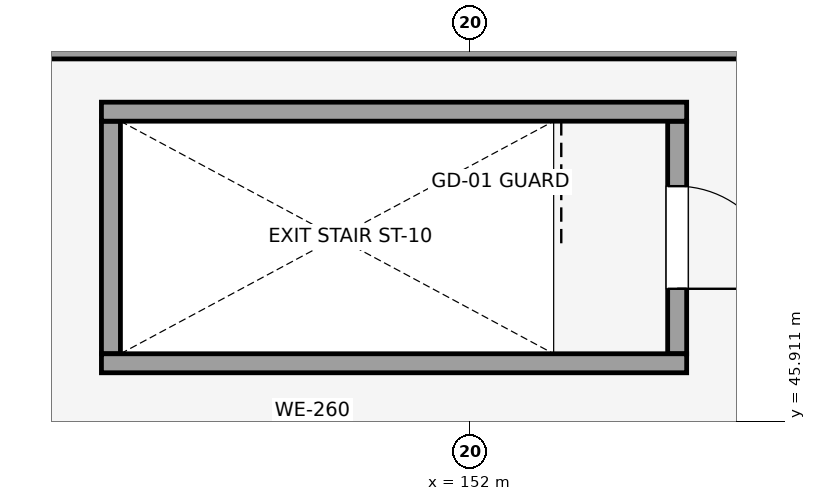
"""IFC4 building model, lengths in metres.
Left out: names, types, materials, properties, quantities, classifications, styles, units other than length and angle.
Written with IfcOpenShell. Run it as: python <this file> out.ifc"""

import sys

from ifc_helpers import new_model, si_unit, direction, frame, frame_2d, origin, place, context, subcontext, project, spatial, rectangle, extrude, element, fill, save


model = new_model("IFC4")
c1 = context("Model", 3, precision=1e-05, world=origin(), true_north=direction((0.0, 1.0)))
c2 = subcontext(c1, "Body", "Model", "MODEL_VIEW")
j1 = project(units=[si_unit("LENGTHUNIT", "METRE"), si_unit("PLANEANGLEUNIT", "RADIAN")], contexts=[c1])
p1 = place(None, origin())
s1 = spatial("IfcSite", under=j1, at=p1, CompositionType="ELEMENT")
p2 = place(p1, origin())
s2 = spatial("IfcBuilding", under=s1, at=p2, CompositionType="ELEMENT")
p3 = place(p2, frame((0.0, 0.0, 9.0)))
s3 = spatial("IfcBuildingStorey", under=s2, at=p3, CompositionType="ELEMENT", Elevation=9.0)
p4 = place(p3, frame((154.725, 49.86, 0.0), z_axis=(0.0, 0.0, 1.0), x_axis=(0.0, -1.0, 0.0)))
e1 = element("IfcWall", 1, at=p4, inside=s3, PredefinedType="SHEAR", context=c2, shape_type="SweptSolid", body=[
    extrude(rectangle(XDim=3.06, YDim=0.25, at=frame_2d((1.53, 0.0))), origin(), (0.0, 0.0, 1.0), 4.8),
])
p5 = place(p4, frame((0.855, 0.0, 0.0)))
e2 = element("IfcOpeningElement", 2, at=p5, cuts=e1, PredefinedType="OPENING", context=c2, shape_type="SweptSolid", body=[
    extrude(rectangle(XDim=1.35, YDim=2.15, at=frame_2d((0.675, 1.075))), frame((0.0, 0.135, 0.0), z_axis=(0.0, -1.0, 0.0), x_axis=(1.0, 0.0, 0.0)), (0.0, 0.0, 1.0), 0.27),
])
p6 = place(p3, frame((147.275, 49.86, 0.0), z_axis=(0.0, 0.0, 1.0), x_axis=(0.0, -1.0, 0.0)))
e3 = element("IfcWall", 3, at=p6, inside=s3, PredefinedType="SHEAR", context=c2, shape_type="SweptSolid", body=[
    extrude(rectangle(XDim=3.06, YDim=0.25, at=frame_2d((1.53, 0.0))), origin(), (0.0, 0.0, 1.0), 4.8),
])
for number, where, z_axis, x_axis in (
    (4, (154.85, 49.985, 0.0), (0.0, 0.0, 1.0), (-1.0, 0.0, 0.0)),
    (5, (154.85, 46.675, 0.0), (0.0, 0.0, 1.0), (-1.0, 0.0, 0.0)),
):
    element("IfcWall", number, at=place(p3, frame(where, z_axis=z_axis, x_axis=x_axis)), inside=s3, PredefinedType="SHEAR", context=c2, shape_type="SweptSolid", body=[
        extrude(rectangle(XDim=7.7, YDim=0.25, at=frame_2d((3.85, 0.0))), origin(), (0.0, 0.0, 1.0), 4.8),
    ])
p7 = place(p3, frame((157.0, 50.8, 0.0), z_axis=(0.0, 0.0, 1.0), x_axis=(-1.0, 0.0, 0.0)))
e6 = element("IfcWall", 6, at=p7, inside=s3, PredefinedType="SOLIDWALL", context=c2, shape_type="SweptSolid", body=[
    extrude(rectangle(XDim=12.809, YDim=0.242, at=frame_2d((6.405, 0.0))), origin(), (0.0, 0.0, 1.0), 2.7),
])
p8 = place(p5, origin())
e7 = element("IfcDoor", 7, at=p8, inside=s3, OperationType="SINGLE_SWING_RIGHT", PredefinedType="DOOR", context=c2, shape_type="SweptSolid", body=[
    extrude(rectangle(XDim=1.35, YDim=2.15, at=frame_2d((0.675, 1.075))), frame((0.0, 0.025, 0.0), z_axis=(0.0, -1.0, 0.0), x_axis=(1.0, 0.0, 0.0)), (0.0, 0.0, 1.0), 0.05),
])
fill(e2, e7)
save(model, sys.argv[1])
